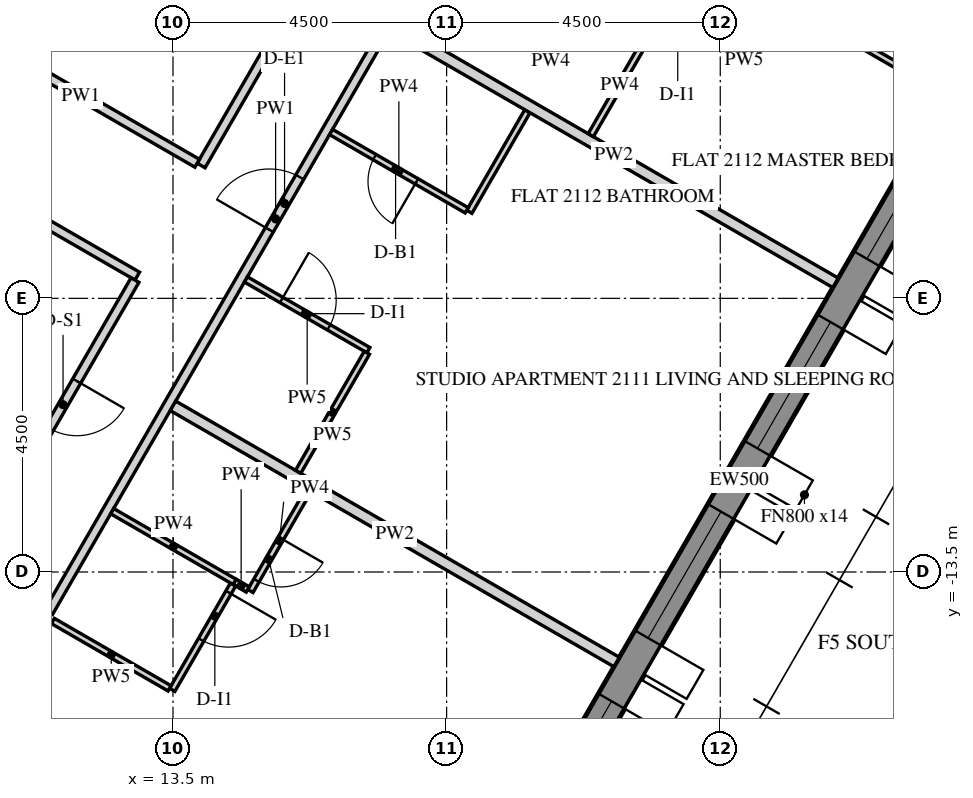
"""IFC4 building model, lengths in metres.
Left out: names, types, materials, properties, quantities, classifications, styles, units other than length and angle.
Written with IfcOpenShell. Run it as: python <this file> out.ifc"""

import sys

from ifc_helpers import new_model, si_unit, direction, frame, frame_2d, origin, place, context, subcontext, project, spatial, polyline, rectangle, outline, extrude, element, fill, save


model = new_model("IFC4")
c1 = context("Model", 3, precision=1e-05, world=origin(), true_north=direction((0.0, 1.0)))
c2 = subcontext(c1, "Body", "Model", "MODEL_VIEW")
j1 = project(units=[si_unit("LENGTHUNIT", "METRE"), si_unit("PLANEANGLEUNIT", "RADIAN")], contexts=[c1])
p1 = place(None, origin())
s1 = spatial("IfcSite", under=j1, at=p1, CompositionType="ELEMENT")
p2 = place(p1, origin())
s2 = spatial("IfcBuilding", under=s1, at=p2, CompositionType="ELEMENT")
p3 = place(p2, frame((0.0, 0.0, 267.9)))
s3 = spatial("IfcBuildingStorey", under=s2, at=p3, CompositionType="ELEMENT", Elevation=267.9)
p4 = place(p3, frame((16.451, -23.005, -0.15), z_axis=(0.0, 0.0, 1.0), x_axis=(0.500003737743, 0.866023245787, 0.0)))
e1 = element("IfcWall", 1, at=p4, inside=s3, PredefinedType="SOLIDWALL", context=c2, shape_type="SweptSolid", body=[
    extrude(outline(polyline([(-0.021, -0.25), (25.468, -0.25), (25.421, 0.25), (0.021, 0.25), (-0.021, -0.25)])), origin(), (0.0, 0.0, 1.0), 3.9),
])
p5 = place(p4, frame((2.522, 0.0, 0.75)))
e2 = element("IfcOpeningElement", 2, at=p5, cuts=e1, PredefinedType="OPENING", context=c2, shape_type="SweptSolid", body=[
    extrude(rectangle(XDim=2.4, YDim=2.7, at=frame_2d((1.2, 1.35))), frame((0.0, 0.26, 0.0), z_axis=(0.0, -1.0, 0.0), x_axis=(1.0, 0.0, 0.0)), (0.0, 0.0, 1.0), 0.52),
])
p6 = place(p4, frame((6.122, 0.0, 0.75)))
e3 = element("IfcOpeningElement", 3, at=p6, cuts=e1, PredefinedType="OPENING", context=c2, shape_type="SweptSolid", body=[
    extrude(rectangle(XDim=2.4, YDim=2.7, at=frame_2d((1.2, 1.35))), frame((0.0, 0.26, 0.0), z_axis=(0.0, -1.0, 0.0), x_axis=(1.0, 0.0, 0.0)), (0.0, 0.0, 1.0), 0.52),
])
p7 = place(p4, frame((9.722, 0.0, 0.75)))
e4 = element("IfcOpeningElement", 4, at=p7, cuts=e1, PredefinedType="OPENING", context=c2, shape_type="SweptSolid", body=[
    extrude(rectangle(XDim=2.4, YDim=2.7, at=frame_2d((1.2, 1.35))), frame((0.0, 0.26, 0.0), z_axis=(0.0, -1.0, 0.0), x_axis=(1.0, 0.0, 0.0)), (0.0, 0.0, 1.0), 0.52),
])
p8 = place(p4, frame((13.323, 0.0, 0.75)))
e5 = element("IfcOpeningElement", 5, at=p8, cuts=e1, PredefinedType="OPENING", context=c2, shape_type="SweptSolid", body=[
    extrude(rectangle(XDim=2.4, YDim=2.7, at=frame_2d((1.2, 1.35))), frame((0.0, 0.26, 0.0), z_axis=(0.0, -1.0, 0.0), x_axis=(1.0, 0.0, 0.0)), (0.0, 0.0, 1.0), 0.52),
])
p9 = place(p4, frame((16.922, 0.0, 0.75)))
e6 = element("IfcOpeningElement", 6, at=p9, cuts=e1, PredefinedType="OPENING", context=c2, shape_type="SweptSolid", body=[
    extrude(rectangle(XDim=2.4, YDim=2.7, at=frame_2d((1.2, 1.35))), frame((0.0, 0.26, 0.0), z_axis=(0.0, -1.0, 0.0), x_axis=(1.0, 0.0, 0.0)), (0.0, 0.0, 1.0), 0.52),
])
p10 = place(p4, frame((20.522, 0.0, 0.75)))
e7 = element("IfcOpeningElement", 7, at=p10, cuts=e1, PredefinedType="OPENING", context=c2, shape_type="SweptSolid", body=[
    extrude(rectangle(XDim=2.4, YDim=2.7, at=frame_2d((1.2, 1.35))), frame((0.0, 0.26, 0.0), z_axis=(0.0, -1.0, 0.0), x_axis=(1.0, 0.0, 0.0)), (0.0, 0.0, 1.0), 0.52),
])
p11 = place(p3, frame((6.235, -10.8, -0.15), z_axis=(0.0, 0.0, 1.0), x_axis=(0.499996419489, 0.866027470984, 0.0)))
e8 = element("IfcWall", 8, at=p11, inside=s3, PredefinedType="SHEAR", context=c2, shape_type="SweptSolid", body=[
    extrude(outline(polyline([(-0.115, -0.2), (12.586, -0.2), (12.355, 0.2), (0.115, 0.2), (-0.115, -0.2)])), origin(), (0.0, 0.0, 1.0), 3.9),
])
p12 = place(p11, frame((5.364, 0.0, 0.15)))
e9 = element("IfcOpeningElement", 9, at=p12, cuts=e8, PredefinedType="OPENING", context=c2, shape_type="SweptSolid", body=[
    extrude(rectangle(XDim=1.8, YDim=2.4, at=frame_2d((0.9, 1.2))), frame((0.0, 0.21, 0.0), z_axis=(0.0, -1.0, 0.0), x_axis=(1.0, 0.0, 0.0)), (0.0, 0.0, 1.0), 0.42),
])
p13 = place(p3, frame((6.351, -11.0, -0.15), z_axis=(0.0, 0.0, 1.0), x_axis=(0.499998894578, -0.866026041999, 0.0)))
e10 = element("IfcWall", 10, at=p13, inside=s3, PredefinedType="SHEAR", context=c2, shape_type="SweptSolid", body=[
    extrude(rectangle(XDim=15.544, YDim=0.4, at=frame_2d((7.772, 0.0))), origin(), (0.0, 0.0, 1.0), 3.9),
])
p14 = place(p13, frame((6.872, 0.0, 0.15)))
e11 = element("IfcOpeningElement", 11, at=p14, cuts=e10, PredefinedType="OPENING", context=c2, shape_type="SweptSolid", body=[
    extrude(rectangle(XDim=1.8, YDim=2.4, at=frame_2d((0.9, 1.2))), frame((0.0, 0.21, 0.0), z_axis=(0.0, -1.0, 0.0), x_axis=(1.0, 0.0, 0.0)), (0.0, 0.0, 1.0), 0.42),
])
p15 = place(p3, frame((13.122, -19.327, 0.0), z_axis=(0.0, 0.0, 1.0), x_axis=(-0.500013707032, 0.866017489881, 0.0)))
e12 = element("IfcWall", 12, at=p15, inside=s3, PredefinedType="PARTITIONING", context=c2, shape_type="SweptSolid", body=[
    extrude(rectangle(XDim=5.781, YDim=0.15, at=frame_2d((2.89, 0.0))), origin(), (0.0, 0.0, 1.0), 2.988),
])
p16 = place(p15, frame((4.481, 0.0, 0.0)))
e13 = element("IfcOpeningElement", 13, at=p16, cuts=e12, PredefinedType="OPENING", context=c2, shape_type="SweptSolid", body=[
    extrude(rectangle(XDim=1.0, YDim=2.1, at=frame_2d((0.5, 1.05))), frame((0.0, 0.085, 0.0), z_axis=(0.0, -1.0, 0.0), x_axis=(1.0, 0.0, 0.0)), (0.0, 0.0, 1.0), 0.17),
])
p17 = place(p3, frame((11.454, -14.16, 0.0), z_axis=(0.0, 0.0, 1.0), x_axis=(0.500000296604, 0.86602523254, 0.0)))
e14 = element("IfcWall", 14, at=p17, inside=s3, PredefinedType="PARTITIONING", context=c2, shape_type="SweptSolid", body=[
    extrude(rectangle(XDim=14.934, YDim=0.15, at=frame_2d((7.467, 0.0))), origin(), (0.0, 0.0, 1.0), 2.988),
])
p18 = place(p17, frame((7.261, 0.0, 0.0)))
e15 = element("IfcOpeningElement", 15, at=p18, cuts=e14, PredefinedType="OPENING", context=c2, shape_type="SweptSolid", body=[
    extrude(rectangle(XDim=1.0, YDim=2.1, at=frame_2d((0.5, 1.05))), frame((0.0, 0.085, 0.0), z_axis=(0.0, -1.0, 0.0), x_axis=(1.0, 0.0, 0.0)), (0.0, 0.0, 1.0), 0.17),
])
p19 = place(p17, frame((13.784, 0.0, 0.0)))
e16 = element("IfcOpeningElement", 16, at=p19, cuts=e14, PredefinedType="OPENING", context=c2, shape_type="SweptSolid", body=[
    extrude(rectangle(XDim=1.0, YDim=2.1, at=frame_2d((0.5, 1.05))), frame((0.0, 0.085, 0.0), z_axis=(0.0, -1.0, 0.0), x_axis=(1.0, 0.0, 0.0)), (0.0, 0.0, 1.0), 0.17),
])
p20 = place(p3, frame((17.112, -1.362, 0.0), z_axis=(0.0, 0.0, 1.0), x_axis=(-0.49999985423, -0.866025487945, 0.0)))
e17 = element("IfcWall", 17, at=p20, inside=s3, PredefinedType="PARTITIONING", context=c2, shape_type="SweptSolid", body=[
    extrude(rectangle(XDim=6.298, YDim=0.15, at=frame_2d((3.149, 0.0))), origin(), (0.0, 0.0, 1.0), 2.988),
])
p21 = place(p3, frame((13.898, -6.778, 0.0), z_axis=(0.0, 0.0, 1.0), x_axis=(-0.866041342403, 0.499972392486, 0.0)))
e18 = element("IfcWall", 18, at=p21, inside=s3, PredefinedType="PARTITIONING", context=c2, shape_type="SweptSolid", body=[
    extrude(rectangle(XDim=4.425, YDim=0.15, at=frame_2d((2.212, 0.0))), origin(), (0.0, 0.0, 1.0), 2.988),
])
p22 = place(p3, frame((9.016, -6.384, 0.0), z_axis=(0.0, 0.0, 1.0), x_axis=(0.866031096941, -0.499990139034, 0.0)))
e19 = element("IfcWall", 19, at=p22, inside=s3, PredefinedType="PARTITIONING", context=c2, shape_type="SweptSolid", body=[
    extrude(rectangle(XDim=4.5, YDim=0.15, at=frame_2d((2.25, 0.0))), origin(), (0.0, 0.0, 1.0), 2.988),
])
p23 = place(p3, frame((12.875, -8.699, 0.0), z_axis=(0.0, 0.0, 1.0), x_axis=(-0.49999482868, -0.866028389427, 0.0)))
e20 = element("IfcWall", 20, at=p23, inside=s3, PredefinedType="PARTITIONING", context=c2, shape_type="SweptSolid", body=[
    extrude(rectangle(XDim=4.733, YDim=0.15, at=frame_2d((2.366, 0.0))), origin(), (0.0, 0.0, 1.0), 2.988),
])
p24 = place(p23, frame((1.917, 0.0, 0.0)))
e21 = element("IfcOpeningElement", 21, at=p24, cuts=e20, PredefinedType="OPENING", context=c2, shape_type="SweptSolid", body=[
    extrude(rectangle(XDim=0.9, YDim=2.1, at=frame_2d((0.45, 1.05))), frame((0.0, 0.085, 0.0), z_axis=(0.0, -1.0, 0.0), x_axis=(1.0, 0.0, 0.0)), (0.0, 0.0, 1.0), 0.17),
])
p25 = place(p3, frame((15.728, -12.158, 0.0), z_axis=(0.0, 0.0, 1.0), x_axis=(-0.499947453424, -0.866055739439, 0.0)))
e22 = element("IfcWall", 22, at=p25, inside=s3, PredefinedType="PARTITIONING", context=c2, shape_type="SweptSolid", body=[
    extrude(rectangle(XDim=1.91, YDim=0.1, at=frame_2d((0.955, 0.0))), origin(), (0.0, 0.0, 1.0), 2.988),
])
p26 = place(p25, frame((0.91, 0.0, 0.0)))
e23 = element("IfcOpeningElement", 23, at=p26, cuts=e22, PredefinedType="OPENING", context=c2, shape_type="SweptSolid", body=[
    extrude(rectangle(XDim=0.8, YDim=2.1, at=frame_2d((0.4, 1.05))), frame((0.0, 0.06, 0.0), z_axis=(0.0, -1.0, 0.0), x_axis=(1.0, 0.0, 0.0)), (0.0, 0.0, 1.0), 0.12),
])
p27 = place(p3, frame((14.73, -13.787, 0.0), z_axis=(0.0, 0.0, 1.0), x_axis=(-0.865669265636, 0.500616342655, 0.0)))
e24 = element("IfcWall", 24, at=p27, inside=s3, PredefinedType="PARTITIONING", context=c2, shape_type="SweptSolid", body=[
    extrude(rectangle(XDim=0.252, YDim=0.1, at=frame_2d((0.126, 0.0))), origin(), (0.0, 0.0, 1.0), 2.988),
])
p28 = place(p3, frame((14.488, -13.706, 0.0), z_axis=(0.0, 0.0, 1.0), x_axis=(-0.500035721725, -0.866004778855, 0.0)))
e25 = element("IfcWall", 25, at=p28, inside=s3, PredefinedType="PARTITIONING", context=c2, shape_type="SweptSolid", body=[
    extrude(rectangle(XDim=2.001, YDim=0.1, at=frame_2d((1.0, 0.0))), origin(), (0.0, 0.0, 1.0), 2.988),
])
p29 = place(p28, frame((0.15, 0.0, 0.0)))
e26 = element("IfcOpeningElement", 26, at=p29, cuts=e25, PredefinedType="OPENING", context=c2, shape_type="SweptSolid", body=[
    extrude(rectangle(XDim=0.9, YDim=2.1, at=frame_2d((0.45, 1.05))), frame((0.0, 0.06, 0.0), z_axis=(0.0, -1.0, 0.0), x_axis=(1.0, 0.0, 0.0)), (0.0, 0.0, 1.0), 0.12),
])
p30 = place(p3, frame((13.444, -15.414, 0.0), z_axis=(0.0, 0.0, 1.0), x_axis=(-0.866024121142, 0.500002221596, 0.0)))
e27 = element("IfcWall", 27, at=p30, inside=s3, PredefinedType="PARTITIONING", context=c2, shape_type="SweptSolid", body=[
    extrude(rectangle(XDim=2.216, YDim=0.1, at=frame_2d((1.108, 0.0))), origin(), (0.0, 0.0, 1.0), 2.988),
])
p31 = place(p3, frame((20.796, -14.98, 0.0), z_axis=(0.0, 0.0, 1.0), x_axis=(-0.866021515814, 0.500006734102, 0.0)))
e28 = element("IfcWall", 28, at=p31, inside=s3, PredefinedType="PARTITIONING", context=c2, shape_type="SweptSolid", body=[
    extrude(rectangle(XDim=8.425, YDim=0.18, at=frame_2d((4.213, 0.0))), origin(), (0.0, 0.0, 1.0), 2.988),
])
p32 = place(p3, frame((12.5, -12.5, 0.0), z_axis=(0.0, 0.0, 1.0), x_axis=(0.865998469481, -0.500046648681, 0.0)))
e29 = element("IfcWall", 29, at=p32, inside=s3, PredefinedType="PARTITIONING", context=c2, shape_type="SweptSolid", body=[
    extrude(rectangle(XDim=2.325, YDim=0.1, at=frame_2d((1.163, 0.0))), origin(), (0.0, 0.0, 1.0), 2.988),
])
p33 = place(p3, frame((19.328, -5.923, 0.0), z_axis=(0.0, 0.0, 1.0), x_axis=(-0.500043324278, -0.866000389056, 0.0)))
e30 = element("IfcWall", 30, at=p33, inside=s3, PredefinedType="PARTITIONING", context=c2, shape_type="SweptSolid", body=[
    extrude(rectangle(XDim=1.91, YDim=0.1, at=frame_2d((0.955, 0.0))), origin(), (0.0, 0.0, 1.0), 2.988),
])
p34 = place(p3, frame((18.33, -7.552, 0.0), z_axis=(0.0, 0.0, 1.0), x_axis=(-0.866046643894, 0.499963209246, 0.0)))
e31 = element("IfcWall", 31, at=p34, inside=s3, PredefinedType="PARTITIONING", context=c2, shape_type="SweptSolid", body=[
    extrude(rectangle(XDim=2.575, YDim=0.1, at=frame_2d((1.288, 0.0))), origin(), (0.0, 0.0, 1.0), 2.988),
])
p35 = place(p34, frame((0.95, 0.0, 0.0)))
e32 = element("IfcOpeningElement", 32, at=p35, cuts=e31, PredefinedType="OPENING", context=c2, shape_type="SweptSolid", body=[
    extrude(rectangle(XDim=0.8, YDim=2.1, at=frame_2d((0.4, 1.05))), frame((0.0, 0.06, 0.0), z_axis=(0.0, -1.0, 0.0), x_axis=(1.0, 0.0, 0.0)), (0.0, 0.0, 1.0), 0.12),
])
p36 = place(p3, frame((14.7, -8.689, 0.0), z_axis=(0.0, 0.0, 1.0), x_axis=(0.866024722723, -0.500001179632, 0.0)))
e33 = element("IfcWall", 33, at=p36, inside=s3, PredefinedType="PARTITIONING", context=c2, shape_type="SweptSolid", body=[
    extrude(rectangle(XDim=2.325, YDim=0.1, at=frame_2d((1.163, 0.0))), origin(), (0.0, 0.0, 1.0), 2.988),
])
p37 = place(p36, frame((0.675, 0.0, 0.0)))
e34 = element("IfcOpeningElement", 34, at=p37, cuts=e33, PredefinedType="OPENING", context=c2, shape_type="SweptSolid", body=[
    extrude(rectangle(XDim=0.9, YDim=2.1, at=frame_2d((0.45, 1.05))), frame((0.0, 0.06, 0.0), z_axis=(0.0, -1.0, 0.0), x_axis=(1.0, 0.0, 0.0)), (0.0, 0.0, 1.0), 0.12),
])
p38 = place(p3, frame((16.688, -9.895, 0.0), z_axis=(0.0, 0.0, 1.0), x_axis=(-0.49995000081, -0.866054268906, 0.0)))
e35 = element("IfcWall", 35, at=p38, inside=s3, PredefinedType="PARTITIONING", context=c2, shape_type="SweptSolid", body=[
    extrude(rectangle(XDim=2.26, YDim=0.1, at=frame_2d((1.13, 0.0))), origin(), (0.0, 0.0, 1.0), 2.988),
])
p39 = place(p3, frame((24.396, -8.745, 0.0), z_axis=(0.0, 0.0, 1.0), x_axis=(-0.866014270972, 0.500019282102, 0.0)))
e36 = element("IfcWall", 36, at=p39, inside=s3, PredefinedType="PARTITIONING", context=c2, shape_type="SweptSolid", body=[
    extrude(rectangle(XDim=8.425, YDim=0.18, at=frame_2d((4.212, 0.0))), origin(), (0.0, 0.0, 1.0), 2.988),
])
p40 = place(p3, frame((20.371, -6.317, 0.0), z_axis=(0.0, 0.0, 1.0), x_axis=(0.49994353734, 0.866058000062, 0.0)))
e37 = element("IfcWall", 37, at=p40, inside=s3, PredefinedType="PARTITIONING", context=c2, shape_type="SweptSolid", body=[
    extrude(rectangle(XDim=1.912, YDim=0.1, at=frame_2d((0.956, 0.0))), origin(), (0.0, 0.0, 1.0), 2.988),
])
p41 = place(p3, frame((26.196, -5.627, 0.0), z_axis=(0.0, 0.0, 1.0), x_axis=(-0.866011596997, 0.500023913295, 0.0)))
e38 = element("IfcWall", 38, at=p41, inside=s3, PredefinedType="PARTITIONING", context=c2, shape_type="SweptSolid", body=[
    extrude(rectangle(XDim=4.65, YDim=0.1, at=frame_2d((2.325, 0.0))), origin(), (0.0, 0.0, 1.0), 2.988),
])
p42 = place(p41, frame((3.6, 0.0, 0.0)))
e39 = element("IfcOpeningElement", 39, at=p42, cuts=e38, PredefinedType="OPENING", context=c2, shape_type="SweptSolid", body=[
    extrude(rectangle(XDim=0.9, YDim=2.1, at=frame_2d((0.45, 1.05))), frame((0.0, 0.06, 0.0), z_axis=(0.0, -1.0, 0.0), x_axis=(1.0, 0.0, 0.0)), (0.0, 0.0, 1.0), 0.12),
])
p43 = place(p6, frame((0.0, 0.18, 0.0)))
e40 = element("IfcWindow", 40, at=p43, inside=s3, PartitioningType="DOUBLE_PANEL_VERTICAL", PredefinedType="WINDOW", context=c2, shape_type="SweptSolid", body=[
    extrude(rectangle(XDim=2.4, YDim=2.7, at=frame_2d((1.2, 1.35))), frame((0.0, 0.03, 0.0), z_axis=(0.0, -1.0, 0.0), x_axis=(1.0, 0.0, 0.0)), (0.0, 0.0, 1.0), 0.06),
])
fill(e3, e40)
p44 = place(p7, frame((0.0, 0.18, 0.0)))
e41 = element("IfcWindow", 41, at=p44, inside=s3, PartitioningType="DOUBLE_PANEL_VERTICAL", PredefinedType="WINDOW", context=c2, shape_type="SweptSolid", body=[
    extrude(rectangle(XDim=2.4, YDim=2.7, at=frame_2d((1.2, 1.35))), frame((0.0, 0.03, 0.0), z_axis=(0.0, -1.0, 0.0), x_axis=(1.0, 0.0, 0.0)), (0.0, 0.0, 1.0), 0.06),
])
fill(e4, e41)
p45 = place(p8, frame((0.0, 0.18, 0.0)))
e42 = element("IfcWindow", 42, at=p45, inside=s3, PartitioningType="DOUBLE_PANEL_VERTICAL", PredefinedType="WINDOW", context=c2, shape_type="SweptSolid", body=[
    extrude(rectangle(XDim=2.4, YDim=2.7, at=frame_2d((1.2, 1.35))), frame((0.0, 0.03, 0.0), z_axis=(0.0, -1.0, 0.0), x_axis=(1.0, 0.0, 0.0)), (0.0, 0.0, 1.0), 0.06),
])
fill(e5, e42)
p46 = place(p9, frame((0.0, 0.18, 0.0)))
e43 = element("IfcWindow", 43, at=p46, inside=s3, PartitioningType="DOUBLE_PANEL_VERTICAL", PredefinedType="WINDOW", context=c2, shape_type="SweptSolid", body=[
    extrude(rectangle(XDim=2.4, YDim=2.7, at=frame_2d((1.2, 1.35))), frame((0.0, 0.03, 0.0), z_axis=(0.0, -1.0, 0.0), x_axis=(1.0, 0.0, 0.0)), (0.0, 0.0, 1.0), 0.06),
])
fill(e6, e43)
p47 = place(p26, origin())
e44 = element("IfcDoor", 44, at=p47, inside=s3, OperationType="SINGLE_SWING_LEFT", PredefinedType="DOOR", context=c2, shape_type="SweptSolid", body=[
    extrude(rectangle(XDim=0.8, YDim=2.1, at=frame_2d((0.4, 1.05))), frame((0.0, 0.025, 0.0), z_axis=(0.0, -1.0, 0.0), x_axis=(1.0, 0.0, 0.0)), (0.0, 0.0, 1.0), 0.05),
])
fill(e23, e44)
p48 = place(p29, origin())
e45 = element("IfcDoor", 45, at=p48, inside=s3, OperationType="SINGLE_SWING_RIGHT", PredefinedType="DOOR", context=c2, shape_type="SweptSolid", body=[
    extrude(rectangle(XDim=0.9, YDim=2.1, at=frame_2d((0.45, 1.05))), frame((0.0, 0.025, 0.0), z_axis=(0.0, -1.0, 0.0), x_axis=(1.0, 0.0, 0.0)), (0.0, 0.0, 1.0), 0.05),
])
fill(e26, e45)
p49 = place(p18, origin())
e46 = element("IfcDoor", 46, at=p49, inside=s3, OperationType="SINGLE_SWING_RIGHT", PredefinedType="DOOR", context=c2, shape_type="SweptSolid", body=[
    extrude(rectangle(XDim=1.0, YDim=2.1, at=frame_2d((0.5, 1.05))), frame((0.0, 0.025, 0.0), z_axis=(0.0, -1.0, 0.0), x_axis=(1.0, 0.0, 0.0)), (0.0, 0.0, 1.0), 0.05),
])
fill(e15, e46)
p50 = place(p35, origin())
e47 = element("IfcDoor", 47, at=p50, inside=s3, OperationType="SINGLE_SWING_LEFT", PredefinedType="DOOR", context=c2, shape_type="SweptSolid", body=[
    extrude(rectangle(XDim=0.8, YDim=2.1, at=frame_2d((0.4, 1.05))), frame((0.0, 0.025, 0.0), z_axis=(0.0, -1.0, 0.0), x_axis=(1.0, 0.0, 0.0)), (0.0, 0.0, 1.0), 0.05),
])
fill(e32, e47)
p51 = place(p37, origin())
e48 = element("IfcDoor", 48, at=p51, inside=s3, OperationType="SINGLE_SWING_RIGHT", PredefinedType="DOOR", context=c2, shape_type="SweptSolid", body=[
    extrude(rectangle(XDim=0.9, YDim=2.1, at=frame_2d((0.45, 1.05))), frame((0.0, 0.025, 0.0), z_axis=(0.0, -1.0, 0.0), x_axis=(1.0, 0.0, 0.0)), (0.0, 0.0, 1.0), 0.05),
])
fill(e34, e48)
p52 = place(p24, origin())
e49 = element("IfcDoor", 49, at=p52, inside=s3, OperationType="SINGLE_SWING_LEFT", PredefinedType="DOOR", context=c2, shape_type="SweptSolid", body=[
    extrude(rectangle(XDim=0.9, YDim=2.1, at=frame_2d((0.45, 1.05))), frame((0.0, 0.025, 0.0), z_axis=(0.0, -1.0, 0.0), x_axis=(1.0, 0.0, 0.0)), (0.0, 0.0, 1.0), 0.05),
])
fill(e21, e49)
save(model, sys.argv[1])
